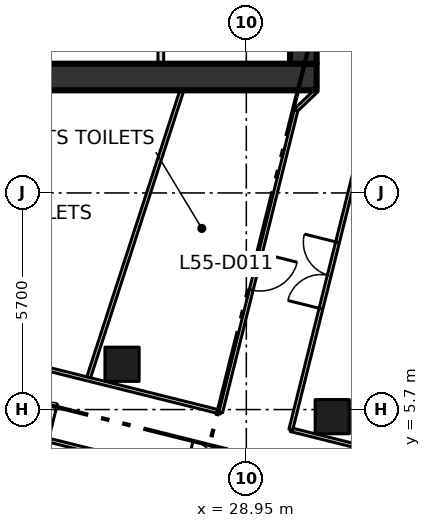
"""IFC4 building model, lengths in metres.
Left out: names, types, materials, properties, quantities, classifications, styles, units other than length and angle.
Written with IfcOpenShell. Run it as: python <this file> out.ifc"""

import sys

from ifc_helpers import new_model, si_unit, direction, frame, frame_2d, origin, origin_2d, place, context, subcontext, project, spatial, rectangle, extrude, element, fill, save


model = new_model("IFC4")
c1 = context("Model", 3, precision=1e-05, world=origin(), true_north=direction((0.0, 1.0)))
c2 = subcontext(c1, "Body", "Model", "MODEL_VIEW")
j1 = project(units=[si_unit("LENGTHUNIT", "METRE"), si_unit("PLANEANGLEUNIT", "RADIAN")], contexts=[c1])
p1 = place(None, origin())
s1 = spatial("IfcSite", under=j1, at=p1, CompositionType="ELEMENT")
p2 = place(p1, origin())
s2 = spatial("IfcBuilding", under=s1, at=p2, CompositionType="ELEMENT")
p3 = place(p2, frame((0.0, 0.0, 242.4)))
s3 = spatial("IfcBuildingStorey", under=s2, at=p3, CompositionType="ELEMENT", Elevation=242.4)
for number, where, z_axis, x_axis in (
    (1, (25.68, 6.892, 0.0), (0.0, 0.0, 1.0), (1.0, 0.0, 0.0)),
    (2, (31.211, 5.513, 0.0), (0.0, 0.0, 1.0), (1.0, 0.0, 0.0)),
):
    element("IfcColumn", number, at=place(p3, frame(where, z_axis=z_axis, x_axis=x_axis)), inside=s3, PredefinedType="COLUMN", context=c2, shape_type="SweptSolid", body=[
        extrude(rectangle(XDim=0.9, YDim=0.9, at=origin_2d()), origin(), (0.0, 0.0, 1.0), 4.2),
    ])
p4 = place(p3, frame((8.0, 14.45, -0.3), z_axis=(0.0, 0.0, 1.0), x_axis=(1.0, 0.0, 0.0)))
e3 = element("IfcWall", 3, at=p4, inside=s3, PredefinedType="SHEAR", context=c2, shape_type="SweptSolid", body=[
    extrude(rectangle(XDim=22.8, YDim=0.7, at=frame_2d((11.4, 0.0))), origin(), (0.0, 0.0, 1.0), 4.2),
])
p5 = place(p4, frame((2.3, 0.0, 0.3)))
e4 = element("IfcOpeningElement", 4, at=p5, cuts=e3, PredefinedType="OPENING", context=c2, shape_type="SweptSolid", body=[
    extrude(rectangle(XDim=1.8, YDim=2.1, at=frame_2d((0.9, 1.05))), frame((0.0, 0.36, 0.0), z_axis=(0.0, -1.0, 0.0), x_axis=(1.0, 0.0, 0.0)), (0.0, 0.0, 1.0), 0.72),
])
p6 = place(p3, frame((30.45, 14.8, -0.3), z_axis=(0.0, 0.0, 1.0), x_axis=(0.0, 1.0, 0.0)))
e5 = element("IfcWall", 5, at=p6, inside=s3, PredefinedType="SHEAR", context=c2, shape_type="SweptSolid", body=[
    extrude(rectangle(XDim=20.9, YDim=0.7, at=frame_2d((10.45, 0.0))), origin(), (0.0, 0.0, 1.0), 4.2),
])
p7 = place(p3, frame((26.7, 14.8, 0.0), z_axis=(0.0, 0.0, 1.0), x_axis=(0.0, 1.0, 0.0)))
e6 = element("IfcWall", 6, at=p7, inside=s3, PredefinedType="PARTITIONING", context=c2, shape_type="SweptSolid", body=[
    extrude(rectangle(XDim=2.825, YDim=0.15, at=frame_2d((1.413, 0.0))), origin(), (0.0, 0.0, 1.0), 3.9),
])
p8 = place(p3, frame((8.55, 8.685, 0.0), z_axis=(0.0, 0.0, 1.0), x_axis=(0.970297603286, -0.241914367199, 0.0)))
e7 = element("IfcWall", 7, at=p8, inside=s3, PredefinedType="PARTITIONING", context=c2, shape_type="SweptSolid", body=[
    extrude(rectangle(XDim=50.675, YDim=0.1, at=frame_2d((25.337, 0.0))), origin(), (0.0, 0.0, 1.0), 3.9),
])
p9 = place(p8, frame((35.657, 0.0, 0.0)))
e8 = element("IfcOpeningElement", 8, at=p9, cuts=e7, PredefinedType="OPENING", context=c2, shape_type="SweptSolid", body=[
    extrude(rectangle(XDim=1.8, YDim=2.1, at=frame_2d((0.9, 1.05))), frame((0.0, 0.06, 0.0), z_axis=(0.0, -1.0, 0.0), x_axis=(1.0, 0.0, 0.0)), (0.0, 0.0, 1.0), 0.12),
])
p10 = place(p8, frame((14.657, 0.0, 0.0)))
e9 = element("IfcOpeningElement", 9, at=p10, cuts=e7, PredefinedType="OPENING", context=c2, shape_type="SweptSolid", body=[
    extrude(rectangle(XDim=1.0, YDim=2.1, at=frame_2d((0.5, 1.05))), frame((0.0, 0.06, 0.0), z_axis=(0.0, -1.0, 0.0), x_axis=(1.0, 0.0, 0.0)), (0.0, 0.0, 1.0), 0.12),
])
p11 = place(p8, frame((19.357, 0.0, 0.0)))
e10 = element("IfcOpeningElement", 10, at=p11, cuts=e7, PredefinedType="OPENING", context=c2, shape_type="SweptSolid", body=[
    extrude(rectangle(XDim=1.8, YDim=2.1, at=frame_2d((0.9, 1.05))), frame((0.0, 0.06, 0.0), z_axis=(0.0, -1.0, 0.0), x_axis=(1.0, 0.0, 0.0)), (0.0, 0.0, 1.0), 0.12),
])
p12 = place(p8, frame((5.38, 0.0, 0.0)))
e11 = element("IfcOpeningElement", 11, at=p12, cuts=e7, PredefinedType="OPENING", context=c2, shape_type="SweptSolid", body=[
    extrude(rectangle(XDim=1.0, YDim=2.1, at=frame_2d((0.5, 1.05))), frame((0.0, 0.06, 0.0), z_axis=(0.0, -1.0, 0.0), x_axis=(1.0, 0.0, 0.0)), (0.0, 0.0, 1.0), 0.12),
])
p13 = place(p3, frame((8.988, 10.44, 0.0), z_axis=(0.0, 0.0, 1.0), x_axis=(0.970301223092, -0.241899848006, 0.0)))
e12 = element("IfcWall", 12, at=p13, inside=s3, PredefinedType="PARTITIONING", context=c2, shape_type="SweptSolid", body=[
    extrude(rectangle(XDim=19.879, YDim=0.1, at=frame_2d((9.94, 0.0))), origin(), (0.0, 0.0, 1.0), 3.9),
])
p14 = place(p13, frame((8.861, 0.0, 0.0)))
e13 = element("IfcOpeningElement", 13, at=p14, cuts=e12, PredefinedType="OPENING", context=c2, shape_type="SweptSolid", body=[
    extrude(rectangle(XDim=1.0, YDim=2.1, at=frame_2d((0.5, 1.05))), frame((0.0, 0.06, 0.0), z_axis=(0.0, -1.0, 0.0), x_axis=(1.0, 0.0, 0.0)), (0.0, 0.0, 1.0), 0.12),
])
p15 = place(p3, frame((30.12, 5.171, 0.0), z_axis=(0.0, 0.0, 1.0), x_axis=(0.970298856921, -0.241909338922, 0.0)))
e14 = element("IfcWall", 14, at=p15, inside=s3, PredefinedType="PARTITIONING", context=c2, shape_type="SweptSolid", body=[
    extrude(rectangle(XDim=28.895, YDim=0.1, at=frame_2d((14.448, 0.0))), origin(), (0.0, 0.0, 1.0), 3.9),
])
p16 = place(p15, frame((8.08, 0.0, 0.0)))
e15 = element("IfcOpeningElement", 15, at=p16, cuts=e14, PredefinedType="OPENING", context=c2, shape_type="SweptSolid", body=[
    extrude(rectangle(XDim=1.0, YDim=2.1, at=frame_2d((0.5, 1.05))), frame((0.0, 0.06, 0.0), z_axis=(0.0, -1.0, 0.0), x_axis=(1.0, 0.0, 0.0)), (0.0, 0.0, 1.0), 0.12),
])
p17 = place(p3, frame((30.12, 5.171, 0.0), z_axis=(0.0, 0.0, 1.0), x_axis=(0.241902913229, 0.970300458915, 0.0)))
e16 = element("IfcWall", 16, at=p17, inside=s3, PredefinedType="PARTITIONING", context=c2, shape_type="SweptSolid", body=[
    extrude(rectangle(XDim=8.172, YDim=0.1, at=frame_2d((4.086, 0.0))), origin(), (0.0, 0.0, 1.0), 3.9),
])
p18 = place(p17, frame((3.28, 0.0, 0.0)))
e17 = element("IfcOpeningElement", 17, at=p18, cuts=e16, PredefinedType="OPENING", context=c2, shape_type="SweptSolid", body=[
    extrude(rectangle(XDim=1.8, YDim=2.1, at=frame_2d((0.9, 1.05))), frame((0.0, 0.06, 0.0), z_axis=(0.0, -1.0, 0.0), x_axis=(1.0, 0.0, 0.0)), (0.0, 0.0, 1.0), 0.12),
])
p19 = place(p3, frame((30.259, 13.583, 0.0), z_axis=(0.0, 0.0, 1.0), x_axis=(-0.241841612879, -0.970315739479, 0.0)))
e18 = element("IfcWall", 18, at=p19, inside=s3, PredefinedType="PARTITIONING", context=c2, shape_type="SweptSolid", body=[
    extrude(rectangle(XDim=8.195, YDim=0.1, at=frame_2d((4.098, 0.0))), origin(), (0.0, 0.0, 1.0), 3.9),
])
p20 = place(p19, frame((3.88, 0.0, 0.0)))
e19 = element("IfcOpeningElement", 19, at=p20, cuts=e18, PredefinedType="OPENING", context=c2, shape_type="SweptSolid", body=[
    extrude(rectangle(XDim=1.0, YDim=2.1, at=frame_2d((0.5, 1.05))), frame((0.0, 0.06, 0.0), z_axis=(0.0, -1.0, 0.0), x_axis=(1.0, 0.0, 0.0)), (0.0, 0.0, 1.0), 0.12),
])
p21 = place(p3, frame((30.8, 14.1, 0.0), z_axis=(0.0, 0.0, 1.0), x_axis=(-0.722911025189, -0.690941133281, 0.0)))
e20 = element("IfcWall", 20, at=p21, inside=s3, PredefinedType="PARTITIONING", context=c2, shape_type="SweptSolid", body=[
    extrude(rectangle(XDim=0.748, YDim=0.1, at=frame_2d((0.374, 0.0))), origin(), (0.0, 0.0, 1.0), 3.9),
])
p22 = place(p3, frame((24.803, 6.552, 0.0), z_axis=(0.0, 0.0, 1.0), x_axis=(0.308946255954, 0.951079497693, 0.0)))
e21 = element("IfcWall", 21, at=p22, inside=s3, PredefinedType="PARTITIONING", context=c2, shape_type="SweptSolid", body=[
    extrude(rectangle(XDim=7.936, YDim=0.1, at=frame_2d((3.968, 0.0))), origin(), (0.0, 0.0, 1.0), 3.9),
])
p23 = place(p20, origin())
e22 = element("IfcDoor", 22, at=p23, inside=s3, OperationType="SINGLE_SWING_LEFT", PredefinedType="DOOR", context=c2, shape_type="SweptSolid", body=[
    extrude(rectangle(XDim=1.0, YDim=2.1, at=frame_2d((0.5, 1.05))), frame((0.0, 0.025, 0.0), z_axis=(0.0, -1.0, 0.0), x_axis=(1.0, 0.0, 0.0)), (0.0, 0.0, 1.0), 0.05),
])
fill(e19, e22)
p24 = place(p18, origin())
e23 = element("IfcDoor", 23, at=p24, inside=s3, OperationType="DOUBLE_DOOR_SINGLE_SWING", PredefinedType="DOOR", context=c2, shape_type="SweptSolid", body=[
    extrude(rectangle(XDim=1.8, YDim=2.1, at=frame_2d((0.9, 1.05))), frame((0.0, 0.025, 0.0), z_axis=(0.0, -1.0, 0.0), x_axis=(1.0, 0.0, 0.0)), (0.0, 0.0, 1.0), 0.05),
])
fill(e17, e23)
save(model, sys.argv[1])
